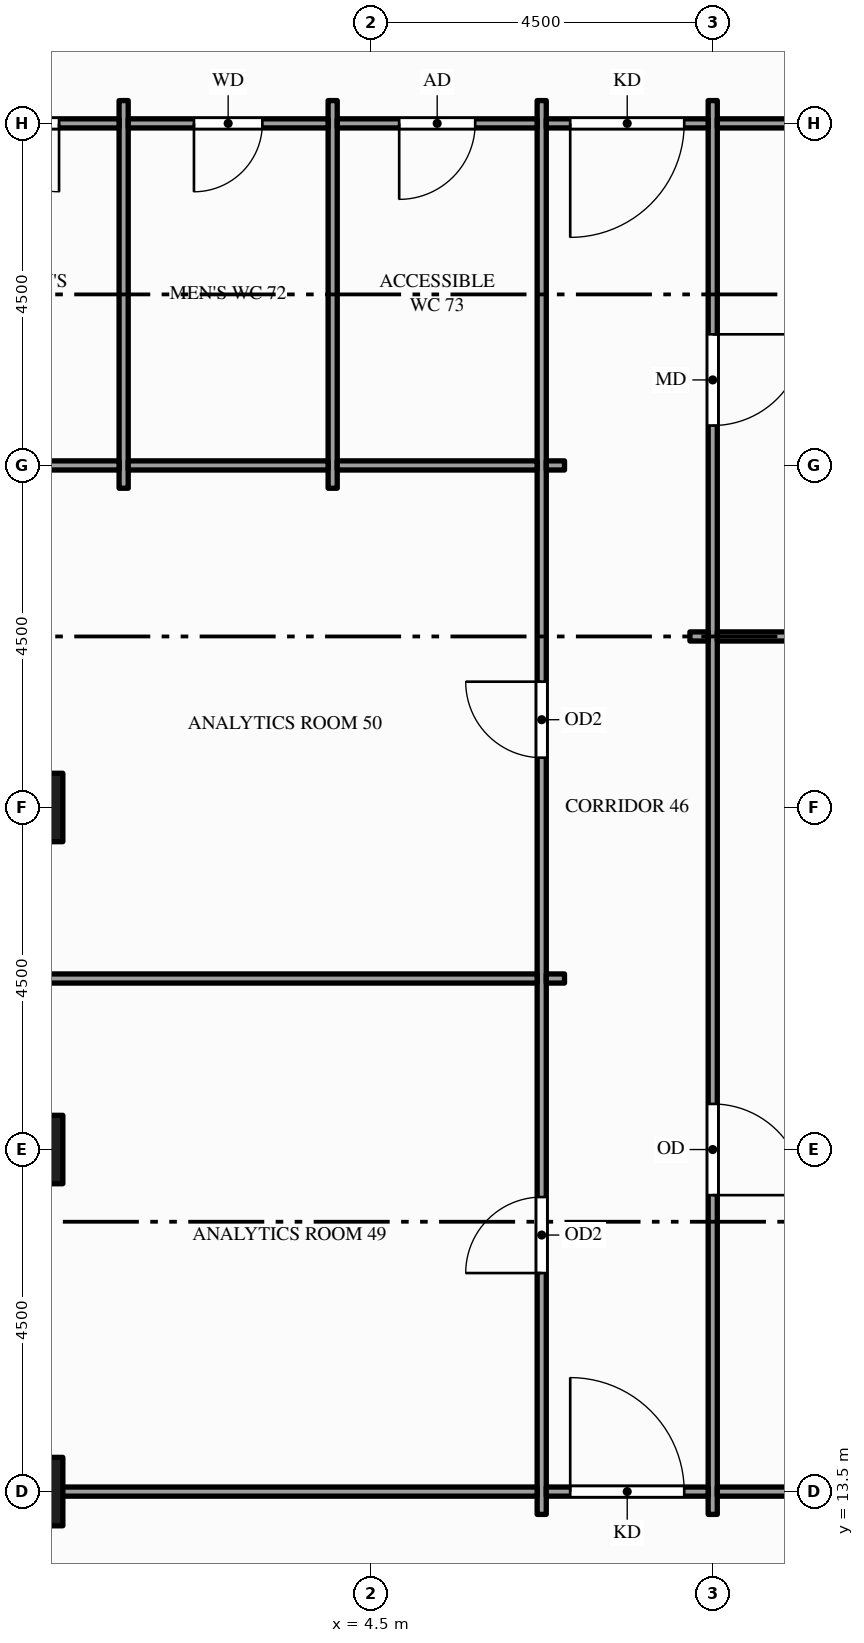
"""IFC4 building model, lengths in metres.
Left out: names, types, materials, properties, quantities, classifications, styles, units other than length and angle.
Written with IfcOpenShell. Run it as: python <this file> out.ifc"""

import sys

from ifc_helpers import new_model, si_unit, direction, frame, frame_2d, origin, origin_2d, place, context, subcontext, project, spatial, rectangle, hollow_rectangle, extrude, element, fill, save


model = new_model("IFC4")
c1 = context("Model", 3, precision=1e-05, world=origin(), true_north=direction((0.0, 1.0)))
c2 = subcontext(c1, "Body", "Model", "MODEL_VIEW")
j1 = project(units=[si_unit("LENGTHUNIT", "METRE"), si_unit("PLANEANGLEUNIT", "RADIAN")], contexts=[c1])
p1 = place(None, origin())
s1 = spatial("IfcSite", under=j1, at=p1, CompositionType="ELEMENT")
p2 = place(p1, origin())
s2 = spatial("IfcBuilding", under=s1, at=p2, CompositionType="ELEMENT")
p3 = place(p2, frame((0.0, 0.0, 171.0)))
s3 = spatial("IfcBuildingStorey", under=s2, at=p3, CompositionType="ELEMENT", Elevation=171.0)
for number, where, z_axis, x_axis in (
    (1, (0.0, 13.5, -0.15), (0.0, 0.0, 1.0), (1.0, 0.0, 0.0)),
    (2, (0.0, 18.0, -0.15), (0.0, 0.0, 1.0), (1.0, 0.0, 0.0)),
    (3, (0.0, 22.5, -0.15), (0.0, 0.0, 1.0), (1.0, 0.0, 0.0)),
):
    element("IfcColumn", number, at=place(p3, frame(where, z_axis=z_axis, x_axis=x_axis)), inside=s3, PredefinedType="COLUMN", context=c2, shape_type="SweptSolid", body=[
        extrude(hollow_rectangle(XDim=0.9, YDim=0.9, WallThickness=0.045, at=origin_2d()), origin(), (0.0, 0.0, 1.0), 4.0),
    ])
for number, where, z_axis, x_axis in (
    (4, (1.25, 26.7, 0.0), (0.0, 0.0, 1.0), (0.0, 1.0, 0.0)),
    (5, (4.0, 26.7, 0.0), (0.0, 0.0, 1.0), (0.0, 1.0, 0.0)),
):
    element("IfcWall", number, at=place(p3, frame(where, z_axis=z_axis, x_axis=x_axis)), inside=s3, PredefinedType="PARTITIONING", context=c2, shape_type="SweptSolid", body=[
        extrude(rectangle(XDim=5.1, YDim=0.12, at=frame_2d((2.55, 0.0))), origin(), (0.0, 0.0, 1.0), 3.85),
    ])
p4 = place(p3, frame((6.75, 13.2, 0.0), z_axis=(0.0, 0.0, 1.0), x_axis=(0.0, 1.0, 0.0)))
e6 = element("IfcWall", 6, at=p4, inside=s3, PredefinedType="PARTITIONING", context=c2, shape_type="SweptSolid", body=[
    extrude(rectangle(XDim=18.6, YDim=0.12, at=frame_2d((9.3, 0.0))), origin(), (0.0, 0.0, 1.0), 2.6),
])
p5 = place(p4, frame((3.175, 0.0, 0.0)))
e7 = element("IfcOpeningElement", 7, at=p5, cuts=e6, PredefinedType="OPENING", context=c2, shape_type="SweptSolid", body=[
    extrude(rectangle(XDim=1.0, YDim=2.1, at=frame_2d((0.5, 1.05))), frame((0.0, 0.07, 0.0), z_axis=(0.0, -1.0, 0.0), x_axis=(1.0, 0.0, 0.0)), (0.0, 0.0, 1.0), 0.14),
])
p6 = place(p4, frame((9.955, 0.0, 0.0)))
e8 = element("IfcOpeningElement", 8, at=p6, cuts=e6, PredefinedType="OPENING", context=c2, shape_type="SweptSolid", body=[
    extrude(rectangle(XDim=1.0, YDim=2.1, at=frame_2d((0.5, 1.05))), frame((0.0, 0.07, 0.0), z_axis=(0.0, -1.0, 0.0), x_axis=(1.0, 0.0, 0.0)), (0.0, 0.0, 1.0), 0.14),
])
p7 = place(p3, frame((9.0, 13.2, 0.0), z_axis=(0.0, 0.0, 1.0), x_axis=(0.0, 1.0, 0.0)))
e9 = element("IfcWall", 9, at=p7, inside=s3, PredefinedType="PARTITIONING", context=c2, shape_type="SweptSolid", body=[
    extrude(rectangle(XDim=18.6, YDim=0.12, at=frame_2d((9.3, 0.0))), origin(), (0.0, 0.0, 1.0), 2.6),
])
p8 = place(p7, frame((14.325, 0.0, 0.0)))
e10 = element("IfcOpeningElement", 10, at=p8, cuts=e9, PredefinedType="OPENING", context=c2, shape_type="SweptSolid", body=[
    extrude(rectangle(XDim=1.2, YDim=2.1, at=frame_2d((0.6, 1.05))), frame((0.0, 0.07, 0.0), z_axis=(0.0, -1.0, 0.0), x_axis=(1.0, 0.0, 0.0)), (0.0, 0.0, 1.0), 0.14),
])
p9 = place(p7, frame((4.2, 0.0, 0.0)))
e11 = element("IfcOpeningElement", 11, at=p9, cuts=e9, PredefinedType="OPENING", context=c2, shape_type="SweptSolid", body=[
    extrude(rectangle(XDim=1.2, YDim=2.1, at=frame_2d((0.6, 1.05))), frame((0.0, 0.07, 0.0), z_axis=(0.0, -1.0, 0.0), x_axis=(1.0, 0.0, 0.0)), (0.0, 0.0, 1.0), 0.14),
])
p10 = place(p3, frame((0.15, 13.5, 0.0), z_axis=(0.0, 0.0, 1.0), x_axis=(1.0, 0.0, 0.0)))
e12 = element("IfcWall", 12, at=p10, inside=s3, PredefinedType="PARTITIONING", context=c2, shape_type="SweptSolid", body=[
    extrude(rectangle(XDim=6.54, YDim=0.12, at=frame_2d((3.27, 0.0))), origin(), (0.0, 0.0, 1.0), 2.87),
])
p11 = place(p3, frame((6.81, 13.5, 0.0), z_axis=(0.0, 0.0, 1.0), x_axis=(1.0, 0.0, 0.0)))
e13 = element("IfcWall", 13, at=p11, inside=s3, PredefinedType="PARTITIONING", context=c2, shape_type="SweptSolid", body=[
    extrude(rectangle(XDim=2.13, YDim=0.12, at=frame_2d((1.065, 0.0))), origin(), (0.0, 0.0, 1.0), 2.87),
])
p12 = place(p11, frame((0.315, 0.0, 0.0)))
e14 = element("IfcOpeningElement", 14, at=p12, cuts=e13, PredefinedType="OPENING", context=c2, shape_type="SweptSolid", body=[
    extrude(rectangle(XDim=1.5, YDim=2.1, at=frame_2d((0.75, 1.05))), frame((0.0, 0.07, 0.0), z_axis=(0.0, -1.0, 0.0), x_axis=(1.0, 0.0, 0.0)), (0.0, 0.0, 1.0), 0.14),
])
p13 = place(p3, frame((9.06, 13.5, 0.0), z_axis=(0.0, 0.0, 1.0), x_axis=(1.0, 0.0, 0.0)))
e15 = element("IfcWall", 15, at=p13, inside=s3, PredefinedType="PARTITIONING", context=c2, shape_type="SweptSolid", body=[
    extrude(rectangle(XDim=17.88, YDim=0.12, at=frame_2d((8.94, 0.0))), origin(), (0.0, 0.0, 1.0), 2.87),
])
p14 = place(p13, frame((3.54, 0.0, 0.0)))
e16 = element("IfcOpeningElement", 16, at=p14, cuts=e15, PredefinedType="OPENING", context=c2, shape_type="SweptSolid", body=[
    extrude(rectangle(XDim=1.8, YDim=2.1, at=frame_2d((0.9, 1.05))), frame((0.0, 0.07, 0.0), z_axis=(0.0, -1.0, 0.0), x_axis=(1.0, 0.0, 0.0)), (0.0, 0.0, 1.0), 0.14),
])
p15 = place(p3, frame((0.15, 20.25, 0.0), z_axis=(0.0, 0.0, 1.0), x_axis=(1.0, 0.0, 0.0)))
e17 = element("IfcWall", 17, at=p15, inside=s3, PredefinedType="PARTITIONING", context=c2, shape_type="SweptSolid", body=[
    extrude(rectangle(XDim=6.54, YDim=0.12, at=frame_2d((3.27, 0.0))), origin(), (0.0, 0.0, 1.0), 2.87),
])
for number, where, z_axis, x_axis in (
    (18, (6.81, 20.25, 0.0), (0.0, 0.0, 1.0), (1.0, 0.0, 0.0)),
    (19, (8.7, 24.75, 0.0), (0.0, 0.0, 1.0), (1.0, 0.0, 0.0)),
):
    element("IfcWall", number, at=place(p3, frame(where, z_axis=z_axis, x_axis=x_axis)), inside=s3, PredefinedType="PARTITIONING", context=c2, shape_type="SweptSolid", body=[
        extrude(rectangle(XDim=0.24, YDim=0.12, at=frame_2d((0.12, 0.0))), origin(), (0.0, 0.0, 1.0), 2.87),
    ])
p16 = place(p3, frame((9.06, 24.75, 0.0), z_axis=(0.0, 0.0, 1.0), x_axis=(1.0, 0.0, 0.0)))
e20 = element("IfcWall", 20, at=p16, inside=s3, PredefinedType="PARTITIONING", context=c2, shape_type="SweptSolid", body=[
    extrude(rectangle(XDim=13.69, YDim=0.12, at=frame_2d((6.845, 0.0))), origin(), (0.0, 0.0, 1.0), 2.87),
])
p17 = place(p3, frame((-1.35, 27.0, 0.0), z_axis=(0.0, 0.0, 1.0), x_axis=(1.0, 0.0, 0.0)))
e21 = element("IfcWall", 21, at=p17, inside=s3, PredefinedType="PARTITIONING", context=c2, shape_type="SweptSolid", body=[
    extrude(rectangle(XDim=2.54, YDim=0.12, at=frame_2d((1.27, 0.0))), origin(), (0.0, 0.0, 1.0), 2.87),
])
for number, where, z_axis, x_axis in (
    (22, (1.31, 27.0, 0.0), (0.0, 0.0, 1.0), (1.0, 0.0, 0.0)),
    (23, (4.06, 27.0, 0.0), (0.0, 0.0, 1.0), (1.0, 0.0, 0.0)),
):
    element("IfcWall", number, at=place(p3, frame(where, z_axis=z_axis, x_axis=x_axis)), inside=s3, PredefinedType="PARTITIONING", context=c2, shape_type="SweptSolid", body=[
        extrude(rectangle(XDim=2.63, YDim=0.12, at=frame_2d((1.315, 0.0))), origin(), (0.0, 0.0, 1.0), 2.87),
    ])
p18 = place(p3, frame((6.81, 27.0, 0.0), z_axis=(0.0, 0.0, 1.0), x_axis=(1.0, 0.0, 0.0)))
e24 = element("IfcWall", 24, at=p18, inside=s3, PredefinedType="PARTITIONING", context=c2, shape_type="SweptSolid", body=[
    extrude(rectangle(XDim=0.24, YDim=0.12, at=frame_2d((0.12, 0.0))), origin(), (0.0, 0.0, 1.0), 2.87),
])
p19 = place(p3, frame((-1.35, 31.5, 0.0), z_axis=(0.0, 0.0, 1.0), x_axis=(1.0, 0.0, 0.0)))
e25 = element("IfcWall", 25, at=p19, inside=s3, PredefinedType="PARTITIONING", context=c2, shape_type="SweptSolid", body=[
    extrude(rectangle(XDim=2.54, YDim=0.12, at=frame_2d((1.27, 0.0))), origin(), (0.0, 0.0, 1.0), 2.87),
])
p20 = place(p19, frame((0.85, 0.0, 0.0)))
e26 = element("IfcOpeningElement", 26, at=p20, cuts=e25, PredefinedType="OPENING", context=c2, shape_type="SweptSolid", body=[
    extrude(rectangle(XDim=0.9, YDim=2.1, at=frame_2d((0.45, 1.05))), frame((0.0, 0.07, 0.0), z_axis=(0.0, -1.0, 0.0), x_axis=(1.0, 0.0, 0.0)), (0.0, 0.0, 1.0), 0.14),
])
p21 = place(p3, frame((1.31, 31.5, 0.0), z_axis=(0.0, 0.0, 1.0), x_axis=(1.0, 0.0, 0.0)))
e27 = element("IfcWall", 27, at=p21, inside=s3, PredefinedType="PARTITIONING", context=c2, shape_type="SweptSolid", body=[
    extrude(rectangle(XDim=2.63, YDim=0.12, at=frame_2d((1.315, 0.0))), origin(), (0.0, 0.0, 1.0), 2.87),
])
p22 = place(p21, frame((0.865, 0.0, 0.0)))
e28 = element("IfcOpeningElement", 28, at=p22, cuts=e27, PredefinedType="OPENING", context=c2, shape_type="SweptSolid", body=[
    extrude(rectangle(XDim=0.9, YDim=2.1, at=frame_2d((0.45, 1.05))), frame((0.0, 0.07, 0.0), z_axis=(0.0, -1.0, 0.0), x_axis=(1.0, 0.0, 0.0)), (0.0, 0.0, 1.0), 0.14),
])
p23 = place(p3, frame((4.06, 31.5, 0.0), z_axis=(0.0, 0.0, 1.0), x_axis=(1.0, 0.0, 0.0)))
e29 = element("IfcWall", 29, at=p23, inside=s3, PredefinedType="PARTITIONING", context=c2, shape_type="SweptSolid", body=[
    extrude(rectangle(XDim=2.63, YDim=0.12, at=frame_2d((1.315, 0.0))), origin(), (0.0, 0.0, 1.0), 2.87),
])
p24 = place(p23, frame((0.815, 0.0, 0.0)))
e30 = element("IfcOpeningElement", 30, at=p24, cuts=e29, PredefinedType="OPENING", context=c2, shape_type="SweptSolid", body=[
    extrude(rectangle(XDim=1.0, YDim=2.1, at=frame_2d((0.5, 1.05))), frame((0.0, 0.07, 0.0), z_axis=(0.0, -1.0, 0.0), x_axis=(1.0, 0.0, 0.0)), (0.0, 0.0, 1.0), 0.14),
])
p25 = place(p3, frame((6.81, 31.5, 0.0), z_axis=(0.0, 0.0, 1.0), x_axis=(1.0, 0.0, 0.0)))
e31 = element("IfcWall", 31, at=p25, inside=s3, PredefinedType="PARTITIONING", context=c2, shape_type="SweptSolid", body=[
    extrude(rectangle(XDim=2.13, YDim=0.12, at=frame_2d((1.065, 0.0))), origin(), (0.0, 0.0, 1.0), 2.87),
])
p26 = place(p25, frame((0.315, 0.0, 0.0)))
e32 = element("IfcOpeningElement", 32, at=p26, cuts=e31, PredefinedType="OPENING", context=c2, shape_type="SweptSolid", body=[
    extrude(rectangle(XDim=1.5, YDim=2.1, at=frame_2d((0.75, 1.05))), frame((0.0, 0.07, 0.0), z_axis=(0.0, -1.0, 0.0), x_axis=(1.0, 0.0, 0.0)), (0.0, 0.0, 1.0), 0.14),
])
p27 = place(p3, frame((9.06, 31.5, 0.0), z_axis=(0.0, 0.0, 1.0), x_axis=(1.0, 0.0, 0.0)))
e33 = element("IfcWall", 33, at=p27, inside=s3, PredefinedType="PARTITIONING", context=c2, shape_type="SweptSolid", body=[
    extrude(rectangle(XDim=11.79, YDim=0.12, at=frame_2d((5.895, 0.0))), origin(), (0.0, 0.0, 1.0), 2.87),
])
p28 = place(p12, origin())
e34 = element("IfcDoor", 34, at=p28, inside=s3, OperationType="SINGLE_SWING_LEFT", PredefinedType="DOOR", context=c2, shape_type="SweptSolid", body=[
    extrude(rectangle(XDim=1.5, YDim=2.1, at=frame_2d((0.75, 1.05))), frame((0.0, 0.025, 0.0), z_axis=(0.0, -1.0, 0.0), x_axis=(1.0, 0.0, 0.0)), (0.0, 0.0, 1.0), 0.05),
])
fill(e14, e34)
p29 = place(p26, origin())
e35 = element("IfcDoor", 35, at=p29, inside=s3, OperationType="SINGLE_SWING_LEFT", PredefinedType="DOOR", context=c2, shape_type="SweptSolid", body=[
    extrude(rectangle(XDim=1.5, YDim=2.1, at=frame_2d((0.75, 1.05))), frame((0.0, 0.025, 0.0), z_axis=(0.0, -1.0, 0.0), x_axis=(1.0, 0.0, 0.0)), (0.0, 0.0, 1.0), 0.05),
])
fill(e32, e35)
p30 = place(p5, origin())
e36 = element("IfcDoor", 36, at=p30, inside=s3, OperationType="SINGLE_SWING_LEFT", PredefinedType="DOOR", context=c2, shape_type="SweptSolid", body=[
    extrude(rectangle(XDim=1.0, YDim=2.1, at=frame_2d((0.5, 1.05))), frame((0.0, 0.025, 0.0), z_axis=(0.0, -1.0, 0.0), x_axis=(1.0, 0.0, 0.0)), (0.0, 0.0, 1.0), 0.05),
])
fill(e7, e36)
p31 = place(p6, origin())
e37 = element("IfcDoor", 37, at=p31, inside=s3, OperationType="SINGLE_SWING_RIGHT", PredefinedType="DOOR", context=c2, shape_type="SweptSolid", body=[
    extrude(rectangle(XDim=1.0, YDim=2.1, at=frame_2d((0.5, 1.05))), frame((0.0, 0.025, 0.0), z_axis=(0.0, -1.0, 0.0), x_axis=(1.0, 0.0, 0.0)), (0.0, 0.0, 1.0), 0.05),
])
fill(e8, e37)
p32 = place(p20, origin())
e38 = element("IfcDoor", 38, at=p32, inside=s3, OperationType="SINGLE_SWING_RIGHT", PredefinedType="DOOR", context=c2, shape_type="SweptSolid", body=[
    extrude(rectangle(XDim=0.9, YDim=2.1, at=frame_2d((0.45, 1.05))), frame((0.0, 0.025, 0.0), z_axis=(0.0, -1.0, 0.0), x_axis=(1.0, 0.0, 0.0)), (0.0, 0.0, 1.0), 0.05),
])
fill(e26, e38)
p33 = place(p22, origin())
e39 = element("IfcDoor", 39, at=p33, inside=s3, OperationType="SINGLE_SWING_LEFT", PredefinedType="DOOR", context=c2, shape_type="SweptSolid", body=[
    extrude(rectangle(XDim=0.9, YDim=2.1, at=frame_2d((0.45, 1.05))), frame((0.0, 0.025, 0.0), z_axis=(0.0, -1.0, 0.0), x_axis=(1.0, 0.0, 0.0)), (0.0, 0.0, 1.0), 0.05),
])
fill(e28, e39)
p34 = place(p24, origin())
e40 = element("IfcDoor", 40, at=p34, inside=s3, OperationType="SINGLE_SWING_LEFT", PredefinedType="DOOR", context=c2, shape_type="SweptSolid", body=[
    extrude(rectangle(XDim=1.0, YDim=2.1, at=frame_2d((0.5, 1.05))), frame((0.0, 0.025, 0.0), z_axis=(0.0, -1.0, 0.0), x_axis=(1.0, 0.0, 0.0)), (0.0, 0.0, 1.0), 0.05),
])
fill(e30, e40)
p35 = place(p8, origin())
e41 = element("IfcDoor", 41, at=p35, inside=s3, OperationType="SINGLE_SWING_RIGHT", PredefinedType="DOOR", context=c2, shape_type="SweptSolid", body=[
    extrude(rectangle(XDim=1.2, YDim=2.1, at=frame_2d((0.6, 1.05))), frame((0.0, 0.025, 0.0), z_axis=(0.0, -1.0, 0.0), x_axis=(1.0, 0.0, 0.0)), (0.0, 0.0, 1.0), 0.05),
])
fill(e10, e41)
p36 = place(p9, origin())
e42 = element("IfcDoor", 42, at=p36, inside=s3, OperationType="SINGLE_SWING_LEFT", PredefinedType="DOOR", context=c2, shape_type="SweptSolid", body=[
    extrude(rectangle(XDim=1.2, YDim=2.1, at=frame_2d((0.6, 1.05))), frame((0.0, 0.025, 0.0), z_axis=(0.0, -1.0, 0.0), x_axis=(1.0, 0.0, 0.0)), (0.0, 0.0, 1.0), 0.05),
])
fill(e11, e42)
save(model, sys.argv[1])
